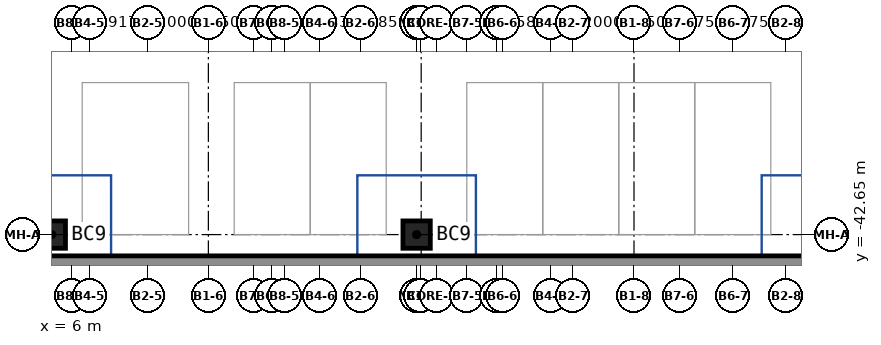
"""IFC4 building model, lengths in metres.
Left out: names, types, materials, properties, quantities, classifications, styles, units other than length and angle.
Written with IfcOpenShell. Run it as: python <this file> out.ifc"""

import sys

from ifc_helpers import new_model, si_unit, direction, frame, frame_2d, origin, origin_2d, place, context, subcontext, project, spatial, rectangle, extrude, source, transform, mapped, element, save


model = new_model("IFC4")
c1 = context("Model", 3, precision=1e-05, world=origin(), true_north=direction((0.0, 1.0)))
c2 = subcontext(c1, "Body", "Model", "MODEL_VIEW")
j1 = project(units=[si_unit("LENGTHUNIT", "METRE"), si_unit("PLANEANGLEUNIT", "RADIAN")], contexts=[c1])
p1 = place(None, origin())
s1 = spatial("IfcSite", under=j1, at=p1, CompositionType="ELEMENT")
p2 = place(p1, origin())
s2 = spatial("IfcBuilding", under=s1, at=p2, CompositionType="ELEMENT")
p3 = place(p2, frame((0.0, 0.0, -9.0)))
s3 = spatial("IfcBuildingStorey", under=s2, at=p3, CompositionType="ELEMENT", Elevation=-9.0)
m1 = source(origin(), c2, "Body", "SweptSolid", [
    extrude(rectangle(XDim=0.9, YDim=0.9, at=origin_2d()), origin(), (0.0, 0.0, 1.0), 4.5),
])
for number, where, z_axis, x_axis in (
    (1, (5.35, -42.65, 0.0), (0.0, 0.0, 1.0), (1.0, 0.0, 0.0)),
    (2, (17.35, -42.65, 0.0), (0.0, 0.0, 1.0), (1.0, 0.0, 0.0)),
):
    element("IfcColumn", number, at=place(p3, frame(where, z_axis=z_axis, x_axis=x_axis)), inside=s3, PredefinedType="COLUMN", context=c2, shape_type="MappedRepresentation", body=[
        mapped(m1, transform((0.0, 0.0, 0.0))),
    ])
m2 = source(origin(), c2, "Body", "SweptSolid", [
    extrude(rectangle(XDim=113.0, YDim=0.5, at=frame_2d((56.5, 0.0))), origin(), (0.0, 0.0, 1.0), 4.9),
])
p4 = place(p3, frame((-57.15, -43.6, -0.4), z_axis=(0.0, 0.0, 1.0), x_axis=(1.0, 0.0, 0.0)))
e3 = element("IfcWall", 3, at=p4, inside=s3, PredefinedType="SOLIDWALL", context=c2, shape_type="MappedRepresentation", body=[
    mapped(m2, transform((0.0, 0.0, 0.0))),
])
save(model, sys.argv[1])
